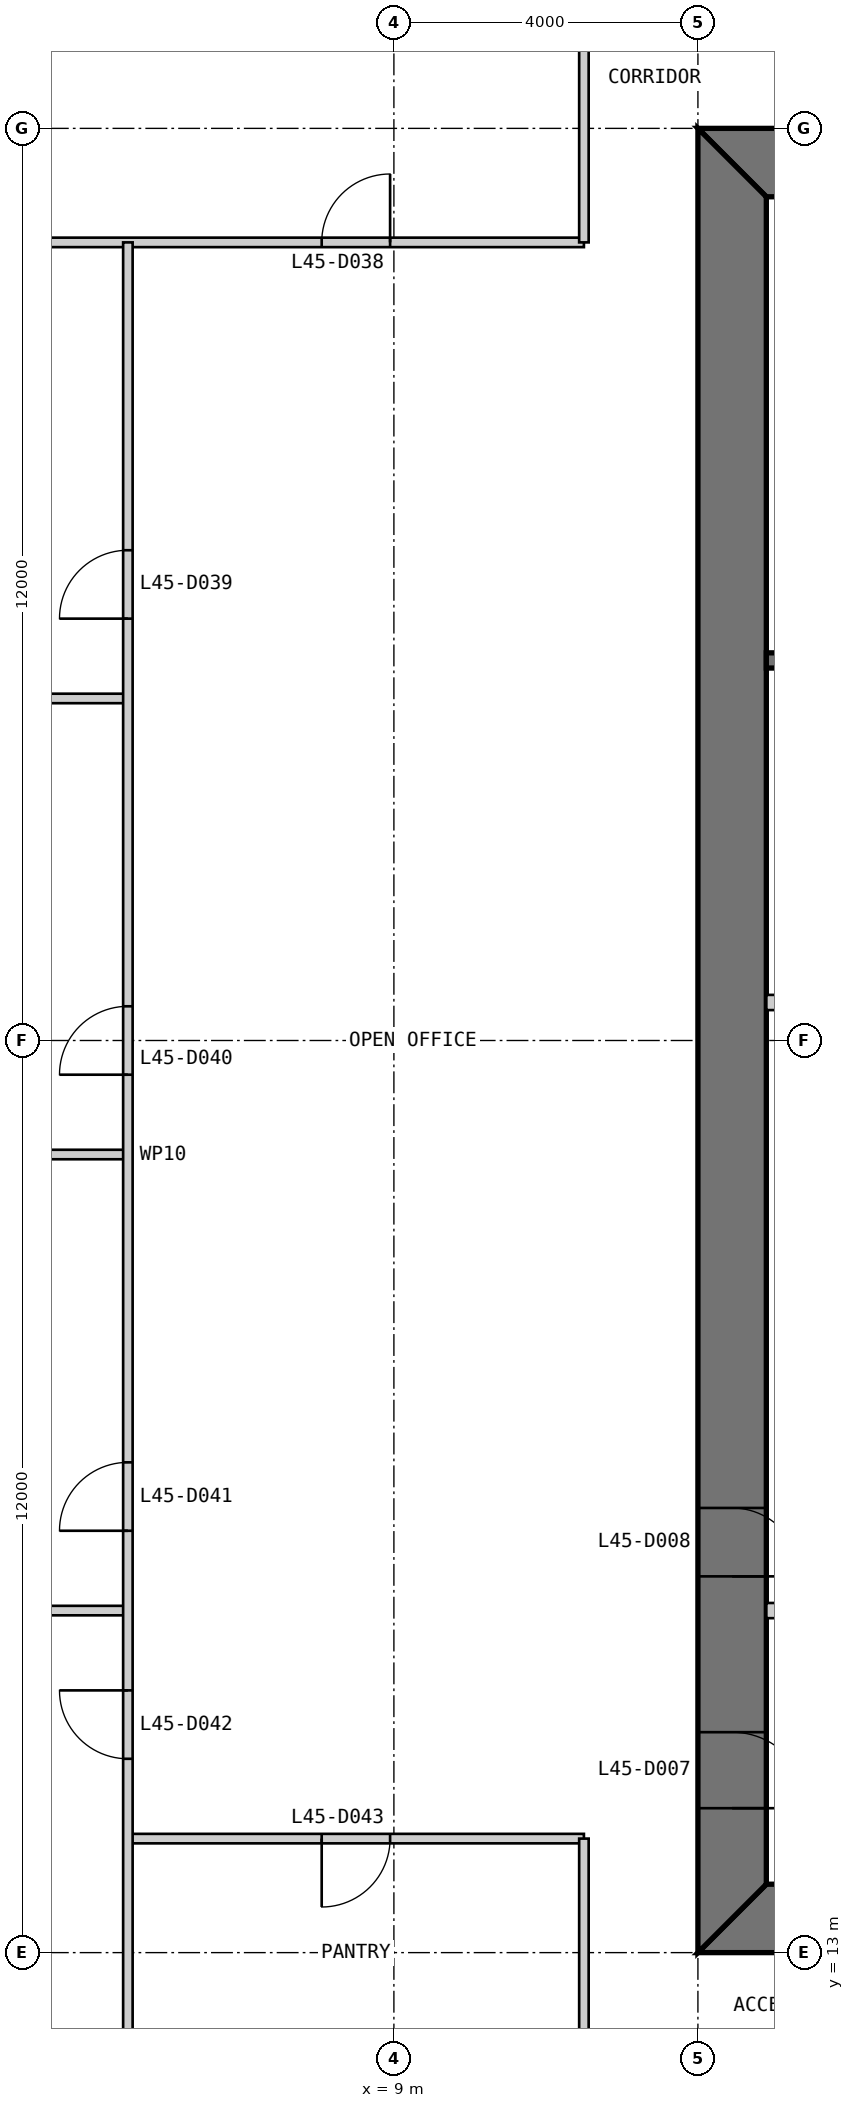
"""IFC4 building model, lengths in metres.
Left out: names, types, materials, properties, quantities, classifications, styles, units other than length and angle.
Written with IfcOpenShell. Run it as: python <this file> out.ifc"""

import sys

from ifc_helpers import new_model, si_unit, direction, frame, frame_2d, origin, place, context, subcontext, project, spatial, polyline, rectangle, outline, extrude, element, fill, save


model = new_model("IFC4")
c1 = context("Model", 3, precision=1e-05, world=origin(), true_north=direction((0.0, 1.0)))
c2 = subcontext(c1, "Body", "Model", "MODEL_VIEW")
j1 = project(units=[si_unit("LENGTHUNIT", "METRE"), si_unit("PLANEANGLEUNIT", "RADIAN")], contexts=[c1])
p1 = place(None, origin())
s1 = spatial("IfcSite", under=j1, at=p1, CompositionType="ELEMENT")
p2 = place(p1, origin())
s2 = spatial("IfcBuilding", under=s1, at=p2, CompositionType="ELEMENT")
p3 = place(p2, frame((0.0, 0.0, 193.8)))
s3 = spatial("IfcBuildingStorey", under=s2, at=p3, CompositionType="ELEMENT", Elevation=193.8)
p4 = place(p3, frame((13.0, 13.45, 0.0), z_axis=(0.0, 0.0, 1.0), x_axis=(1.0, 0.0, 0.0)))
e1 = element("IfcWall", 1, at=p4, inside=s3, PredefinedType="SHEAR", context=c2, shape_type="SweptSolid", body=[
    extrude(outline(polyline([(0.0, -0.45), (24.0, -0.45), (23.1, 0.45), (0.9, 0.45), (0.0, -0.45)])), origin(), (0.0, 0.0, 1.0), 4.0),
])
p5 = place(p4, frame((4.9, 0.0, 0.0)))
e2 = element("IfcOpeningElement", 2, at=p5, cuts=e1, PredefinedType="OPENING", context=c2, shape_type="SweptSolid", body=[
    extrude(rectangle(XDim=1.0, YDim=2.2, at=frame_2d((0.5, 1.1))), frame((0.0, 0.46, 0.0), z_axis=(0.0, -1.0, 0.0), x_axis=(1.0, 0.0, 0.0)), (0.0, 0.0, 1.0), 0.92),
])
p6 = place(p4, frame((8.9, 0.0, 0.0)))
e3 = element("IfcOpeningElement", 3, at=p6, cuts=e1, PredefinedType="OPENING", context=c2, shape_type="SweptSolid", body=[
    extrude(rectangle(XDim=1.1, YDim=2.2, at=frame_2d((0.55, 1.1))), frame((0.0, 0.46, 0.0), z_axis=(0.0, -1.0, 0.0), x_axis=(1.0, 0.0, 0.0)), (0.0, 0.0, 1.0), 0.92),
])
p7 = place(p4, frame((15.05, 0.0, 0.0)))
e4 = element("IfcOpeningElement", 4, at=p7, cuts=e1, PredefinedType="OPENING", context=c2, shape_type="SweptSolid", body=[
    extrude(rectangle(XDim=0.9, YDim=2.2, at=frame_2d((0.45, 1.1))), frame((0.0, 0.46, 0.0), z_axis=(0.0, -1.0, 0.0), x_axis=(1.0, 0.0, 0.0)), (0.0, 0.0, 1.0), 0.92),
])
p8 = place(p4, frame((17.9, 0.0, 0.0)))
e5 = element("IfcOpeningElement", 5, at=p8, cuts=e1, PredefinedType="OPENING", context=c2, shape_type="SweptSolid", body=[
    extrude(rectangle(XDim=1.0, YDim=2.2, at=frame_2d((0.5, 1.1))), frame((0.0, 0.46, 0.0), z_axis=(0.0, -1.0, 0.0), x_axis=(1.0, 0.0, 0.0)), (0.0, 0.0, 1.0), 0.92),
])
p9 = place(p4, frame((21.4, 0.0, 0.0)))
e6 = element("IfcOpeningElement", 6, at=p9, cuts=e1, PredefinedType="OPENING", context=c2, shape_type="SweptSolid", body=[
    extrude(rectangle(XDim=1.0, YDim=2.2, at=frame_2d((0.5, 1.1))), frame((0.0, 0.46, 0.0), z_axis=(0.0, -1.0, 0.0), x_axis=(1.0, 0.0, 0.0)), (0.0, 0.0, 1.0), 0.92),
])
p10 = place(p3, frame((37.0, 36.55, 0.0), z_axis=(0.0, 0.0, 1.0), x_axis=(-1.0, 0.0, 0.0)))
e7 = element("IfcWall", 7, at=p10, inside=s3, PredefinedType="SHEAR", context=c2, shape_type="SweptSolid", body=[
    extrude(outline(polyline([(0.0, -0.45), (24.0, -0.45), (23.1, 0.45), (0.9, 0.45), (0.0, -0.45)])), origin(), (0.0, 0.0, 1.0), 4.0),
])
p11 = place(p10, frame((4.9, 0.0, 0.0)))
e8 = element("IfcOpeningElement", 8, at=p11, cuts=e7, PredefinedType="OPENING", context=c2, shape_type="SweptSolid", body=[
    extrude(rectangle(XDim=1.0, YDim=2.2, at=frame_2d((0.5, 1.1))), frame((0.0, 0.46, 0.0), z_axis=(0.0, -1.0, 0.0), x_axis=(1.0, 0.0, 0.0)), (0.0, 0.0, 1.0), 0.92),
])
p12 = place(p10, frame((8.9, 0.0, 0.0)))
e9 = element("IfcOpeningElement", 9, at=p12, cuts=e7, PredefinedType="OPENING", context=c2, shape_type="SweptSolid", body=[
    extrude(rectangle(XDim=1.1, YDim=2.2, at=frame_2d((0.55, 1.1))), frame((0.0, 0.46, 0.0), z_axis=(0.0, -1.0, 0.0), x_axis=(1.0, 0.0, 0.0)), (0.0, 0.0, 1.0), 0.92),
])
p13 = place(p10, frame((15.05, 0.0, 0.0)))
e10 = element("IfcOpeningElement", 10, at=p13, cuts=e7, PredefinedType="OPENING", context=c2, shape_type="SweptSolid", body=[
    extrude(rectangle(XDim=0.9, YDim=2.2, at=frame_2d((0.45, 1.1))), frame((0.0, 0.46, 0.0), z_axis=(0.0, -1.0, 0.0), x_axis=(1.0, 0.0, 0.0)), (0.0, 0.0, 1.0), 0.92),
])
p14 = place(p10, frame((17.9, 0.0, 0.0)))
e11 = element("IfcOpeningElement", 11, at=p14, cuts=e7, PredefinedType="OPENING", context=c2, shape_type="SweptSolid", body=[
    extrude(rectangle(XDim=1.0, YDim=2.2, at=frame_2d((0.5, 1.1))), frame((0.0, 0.46, 0.0), z_axis=(0.0, -1.0, 0.0), x_axis=(1.0, 0.0, 0.0)), (0.0, 0.0, 1.0), 0.92),
])
p15 = place(p10, frame((21.4, 0.0, 0.0)))
e12 = element("IfcOpeningElement", 12, at=p15, cuts=e7, PredefinedType="OPENING", context=c2, shape_type="SweptSolid", body=[
    extrude(rectangle(XDim=1.0, YDim=2.2, at=frame_2d((0.5, 1.1))), frame((0.0, 0.46, 0.0), z_axis=(0.0, -1.0, 0.0), x_axis=(1.0, 0.0, 0.0)), (0.0, 0.0, 1.0), 0.92),
])
p16 = place(p3, frame((13.45, 36.1, 0.0), z_axis=(0.0, 0.0, 1.0), x_axis=(0.0, -1.0, 0.0)))
e13 = element("IfcWall", 13, at=p16, inside=s3, PredefinedType="SHEAR", context=c2, shape_type="SweptSolid", body=[
    extrude(outline(polyline([(-0.9, -0.45), (23.1, -0.45), (22.2, 0.45), (0.0, 0.45), (-0.9, -0.45)])), origin(), (0.0, 0.0, 1.0), 4.0),
])
p17 = place(p16, frame((20.2, 0.0, 0.0)))
e14 = element("IfcOpeningElement", 14, at=p17, cuts=e13, PredefinedType="OPENING", context=c2, shape_type="SweptSolid", body=[
    extrude(rectangle(XDim=1.0, YDim=2.2, at=frame_2d((0.5, 1.1))), frame((0.0, 0.46, 0.0), z_axis=(0.0, -1.0, 0.0), x_axis=(1.0, 0.0, 0.0)), (0.0, 0.0, 1.0), 0.92),
])
p18 = place(p16, frame((17.25, 0.0, 0.0)))
e15 = element("IfcOpeningElement", 15, at=p18, cuts=e13, PredefinedType="OPENING", context=c2, shape_type="SweptSolid", body=[
    extrude(rectangle(XDim=0.9, YDim=2.2, at=frame_2d((0.45, 1.1))), frame((0.0, 0.46, 0.0), z_axis=(0.0, -1.0, 0.0), x_axis=(1.0, 0.0, 0.0)), (0.0, 0.0, 1.0), 0.92),
])
for number, where, z_axis, x_axis in (
    (16, (13.9, 17.5, 0.0), (0.0, 0.0, 1.0), (1.0, 0.0, 0.0)),
    (17, (13.9, 25.5, 0.0), (0.0, 0.0, 1.0), (1.0, 0.0, 0.0)),
):
    element("IfcWall", number, at=place(p3, frame(where, z_axis=z_axis, x_axis=x_axis)), inside=s3, PredefinedType="PARTITIONING", context=c2, shape_type="SweptSolid", body=[
        extrude(rectangle(XDim=2.8, YDim=0.2, at=frame_2d((1.4, 0.0))), origin(), (0.0, 0.0, 1.0), 3.8),
    ])
p19 = place(p3, frame((29.7, 30.0, 0.0), z_axis=(0.0, 0.0, 1.0), x_axis=(-1.0, 0.0, 0.0)))
e18 = element("IfcWall", 18, at=p19, inside=s3, PredefinedType="SOLIDWALL", context=c2, shape_type="SweptSolid", body=[
    extrude(rectangle(XDim=15.8, YDim=0.2, at=frame_2d((7.9, 0.0))), origin(), (0.0, 0.0, 1.0), 3.8),
])
p20 = place(p3, frame((0.15, 35.5, 0.0), z_axis=(0.0, 0.0, 1.0), x_axis=(1.0, 0.0, 0.0)))
e19 = element("IfcWall", 19, at=p20, inside=s3, PredefinedType="PARTITIONING", context=c2, shape_type="SweptSolid", body=[
    extrude(rectangle(XDim=11.35, YDim=0.125, at=frame_2d((5.675, 0.0))), origin(), (0.0, 0.0, 1.0), 3.85),
])
p21 = place(p20, frame((7.9, 0.0, 0.0)))
e20 = element("IfcOpeningElement", 20, at=p21, cuts=e19, PredefinedType="OPENING", context=c2, shape_type="SweptSolid", body=[
    extrude(rectangle(XDim=0.9, YDim=2.2, at=frame_2d((0.45, 1.1))), frame((0.0, 0.073, 0.0), z_axis=(0.0, -1.0, 0.0), x_axis=(1.0, 0.0, 0.0)), (0.0, 0.0, 1.0), 0.145),
])
for number, where, z_axis, x_axis in (
    (21, (0.15, 29.5, 0.0), (0.0, 0.0, 1.0), (1.0, 0.0, 0.0)),
    (22, (0.15, 23.5, 0.0), (0.0, 0.0, 1.0), (1.0, 0.0, 0.0)),
    (23, (0.15, 17.5, 0.0), (0.0, 0.0, 1.0), (1.0, 0.0, 0.0)),
):
    element("IfcWall", number, at=place(p3, frame(where, z_axis=z_axis, x_axis=x_axis)), inside=s3, PredefinedType="PARTITIONING", context=c2, shape_type="SweptSolid", body=[
        extrude(rectangle(XDim=5.35, YDim=0.125, at=frame_2d((2.675, 0.0))), origin(), (0.0, 0.0, 1.0), 3.85),
    ])
p22 = place(p3, frame((5.5, 14.5, 0.0), z_axis=(0.0, 0.0, 1.0), x_axis=(1.0, 0.0, 0.0)))
e24 = element("IfcWall", 24, at=p22, inside=s3, PredefinedType="PARTITIONING", context=c2, shape_type="SweptSolid", body=[
    extrude(rectangle(XDim=6.0, YDim=0.125, at=frame_2d((3.0, 0.0))), origin(), (0.0, 0.0, 1.0), 3.85),
])
p23 = place(p22, frame((2.55, 0.0, 0.0)))
e25 = element("IfcOpeningElement", 25, at=p23, cuts=e24, PredefinedType="OPENING", context=c2, shape_type="SweptSolid", body=[
    extrude(rectangle(XDim=0.9, YDim=2.2, at=frame_2d((0.45, 1.1))), frame((0.0, 0.073, 0.0), z_axis=(0.0, -1.0, 0.0), x_axis=(1.0, 0.0, 0.0)), (0.0, 0.0, 1.0), 0.145),
])
p24 = place(p3, frame((5.5, 35.5, 0.0), z_axis=(0.0, 0.0, 1.0), x_axis=(0.0, -1.0, 0.0)))
e26 = element("IfcWall", 26, at=p24, inside=s3, PredefinedType="PARTITIONING", context=c2, shape_type="SweptSolid", body=[
    extrude(rectangle(XDim=24.0, YDim=0.125, at=frame_2d((12.0, 0.0))), origin(), (0.0, 0.0, 1.0), 3.85),
])
p25 = place(p24, frame((4.05, 0.0, 0.0)))
e27 = element("IfcOpeningElement", 27, at=p25, cuts=e26, PredefinedType="OPENING", context=c2, shape_type="SweptSolid", body=[
    extrude(rectangle(XDim=0.9, YDim=2.2, at=frame_2d((0.45, 1.1))), frame((0.0, 0.073, 0.0), z_axis=(0.0, -1.0, 0.0), x_axis=(1.0, 0.0, 0.0)), (0.0, 0.0, 1.0), 0.145),
])
p26 = place(p24, frame((10.05, 0.0, 0.0)))
e28 = element("IfcOpeningElement", 28, at=p26, cuts=e26, PredefinedType="OPENING", context=c2, shape_type="SweptSolid", body=[
    extrude(rectangle(XDim=0.9, YDim=2.2, at=frame_2d((0.45, 1.1))), frame((0.0, 0.073, 0.0), z_axis=(0.0, -1.0, 0.0), x_axis=(1.0, 0.0, 0.0)), (0.0, 0.0, 1.0), 0.145),
])
p27 = place(p24, frame((16.05, 0.0, 0.0)))
e29 = element("IfcOpeningElement", 29, at=p27, cuts=e26, PredefinedType="OPENING", context=c2, shape_type="SweptSolid", body=[
    extrude(rectangle(XDim=0.9, YDim=2.2, at=frame_2d((0.45, 1.1))), frame((0.0, 0.073, 0.0), z_axis=(0.0, -1.0, 0.0), x_axis=(1.0, 0.0, 0.0)), (0.0, 0.0, 1.0), 0.145),
])
p28 = place(p24, frame((19.05, 0.0, 0.0)))
e30 = element("IfcOpeningElement", 30, at=p28, cuts=e26, PredefinedType="OPENING", context=c2, shape_type="SweptSolid", body=[
    extrude(rectangle(XDim=0.9, YDim=2.2, at=frame_2d((0.45, 1.1))), frame((0.0, 0.073, 0.0), z_axis=(0.0, -1.0, 0.0), x_axis=(1.0, 0.0, 0.0)), (0.0, 0.0, 1.0), 0.145),
])
for number, where, z_axis, x_axis in (
    (31, (11.5, 38.5, 0.0), (0.0, 0.0, 1.0), (0.0, -1.0, 0.0)),
    (32, (11.5, 14.5, 0.0), (0.0, 0.0, 1.0), (0.0, -1.0, 0.0)),
):
    element("IfcWall", number, at=place(p3, frame(where, z_axis=z_axis, x_axis=x_axis)), inside=s3, PredefinedType="PARTITIONING", context=c2, shape_type="SweptSolid", body=[
        extrude(rectangle(XDim=3.0, YDim=0.125, at=frame_2d((1.5, 0.0))), origin(), (0.0, 0.0, 1.0), 3.85),
    ])
p29 = place(p17, origin())
e33 = element("IfcDoor", 33, at=p29, inside=s3, OperationType="SINGLE_SWING_RIGHT", PredefinedType="DOOR", context=c2, shape_type="SweptSolid", body=[
    extrude(rectangle(XDim=1.0, YDim=2.2, at=frame_2d((0.5, 1.1))), frame((0.0, 0.025, 0.0), z_axis=(0.0, -1.0, 0.0), x_axis=(1.0, 0.0, 0.0)), (0.0, 0.0, 1.0), 0.05),
    extrude(outline(polyline([(0.0, 0.0), (0.04, 0.0), (0.04, 2.16), (0.96, 2.16), (0.96, 0.0), (1.0, 0.0), (1.0, 2.2), (0.0, 2.2), (0.0, 0.0)])), frame((0.0, 0.3, 0.0), z_axis=(0.0, -1.0, 0.0), x_axis=(1.0, 0.0, 0.0)), (0.0, 0.0, 1.0), 0.6),
])
fill(e14, e33)
p30 = place(p18, origin())
e34 = element("IfcDoor", 34, at=p30, inside=s3, OperationType="SINGLE_SWING_RIGHT", PredefinedType="DOOR", context=c2, shape_type="SweptSolid", body=[
    extrude(rectangle(XDim=0.9, YDim=2.2, at=frame_2d((0.45, 1.1))), frame((0.0, 0.025, 0.0), z_axis=(0.0, -1.0, 0.0), x_axis=(1.0, 0.0, 0.0)), (0.0, 0.0, 1.0), 0.05),
    extrude(outline(polyline([(0.0, 0.0), (0.04, 0.0), (0.04, 2.16), (0.86, 2.16), (0.86, 0.0), (0.9, 0.0), (0.9, 2.2), (0.0, 2.2), (0.0, 0.0)])), frame((0.0, 0.3, 0.0), z_axis=(0.0, -1.0, 0.0), x_axis=(1.0, 0.0, 0.0)), (0.0, 0.0, 1.0), 0.6),
])
fill(e15, e34)
p31 = place(p21, origin())
e35 = element("IfcDoor", 35, at=p31, inside=s3, OperationType="SINGLE_SWING_RIGHT", PredefinedType="DOOR", context=c2, shape_type="SweptSolid", body=[
    extrude(rectangle(XDim=0.9, YDim=2.2, at=frame_2d((0.45, 1.1))), frame((0.0, 0.025, 0.0), z_axis=(0.0, -1.0, 0.0), x_axis=(1.0, 0.0, 0.0)), (0.0, 0.0, 1.0), 0.05),
])
fill(e20, e35)
p32 = place(p25, frame((0.9, 0.0, 0.0), z_axis=(0.0, 0.0, 1.0), x_axis=(-1.0, 0.0, 0.0)))
e36 = element("IfcDoor", 36, at=p32, inside=s3, OperationType="SINGLE_SWING_LEFT", PredefinedType="DOOR", context=c2, shape_type="SweptSolid", body=[
    extrude(rectangle(XDim=0.9, YDim=2.2, at=frame_2d((0.45, 1.1))), frame((0.0, 0.025, 0.0), z_axis=(0.0, -1.0, 0.0), x_axis=(1.0, 0.0, 0.0)), (0.0, 0.0, 1.0), 0.05),
])
fill(e27, e36)
p33 = place(p26, frame((0.9, 0.0, 0.0), z_axis=(0.0, 0.0, 1.0), x_axis=(-1.0, 0.0, 0.0)))
e37 = element("IfcDoor", 37, at=p33, inside=s3, OperationType="SINGLE_SWING_LEFT", PredefinedType="DOOR", context=c2, shape_type="SweptSolid", body=[
    extrude(rectangle(XDim=0.9, YDim=2.2, at=frame_2d((0.45, 1.1))), frame((0.0, 0.025, 0.0), z_axis=(0.0, -1.0, 0.0), x_axis=(1.0, 0.0, 0.0)), (0.0, 0.0, 1.0), 0.05),
])
fill(e28, e37)
p34 = place(p27, frame((0.9, 0.0, 0.0), z_axis=(0.0, 0.0, 1.0), x_axis=(-1.0, 0.0, 0.0)))
e38 = element("IfcDoor", 38, at=p34, inside=s3, OperationType="SINGLE_SWING_LEFT", PredefinedType="DOOR", context=c2, shape_type="SweptSolid", body=[
    extrude(rectangle(XDim=0.9, YDim=2.2, at=frame_2d((0.45, 1.1))), frame((0.0, 0.025, 0.0), z_axis=(0.0, -1.0, 0.0), x_axis=(1.0, 0.0, 0.0)), (0.0, 0.0, 1.0), 0.05),
])
fill(e29, e38)
p35 = place(p28, frame((0.9, 0.0, 0.0), z_axis=(0.0, 0.0, 1.0), x_axis=(-1.0, 0.0, 0.0)))
e39 = element("IfcDoor", 39, at=p35, inside=s3, OperationType="SINGLE_SWING_RIGHT", PredefinedType="DOOR", context=c2, shape_type="SweptSolid", body=[
    extrude(rectangle(XDim=0.9, YDim=2.2, at=frame_2d((0.45, 1.1))), frame((0.0, 0.025, 0.0), z_axis=(0.0, -1.0, 0.0), x_axis=(1.0, 0.0, 0.0)), (0.0, 0.0, 1.0), 0.05),
])
fill(e30, e39)
p36 = place(p23, frame((0.9, 0.0, 0.0), z_axis=(0.0, 0.0, 1.0), x_axis=(-1.0, 0.0, 0.0)))
e40 = element("IfcDoor", 40, at=p36, inside=s3, OperationType="SINGLE_SWING_RIGHT", PredefinedType="DOOR", context=c2, shape_type="SweptSolid", body=[
    extrude(rectangle(XDim=0.9, YDim=2.2, at=frame_2d((0.45, 1.1))), frame((0.0, 0.025, 0.0), z_axis=(0.0, -1.0, 0.0), x_axis=(1.0, 0.0, 0.0)), (0.0, 0.0, 1.0), 0.05),
])
fill(e25, e40)
save(model, sys.argv[1])
